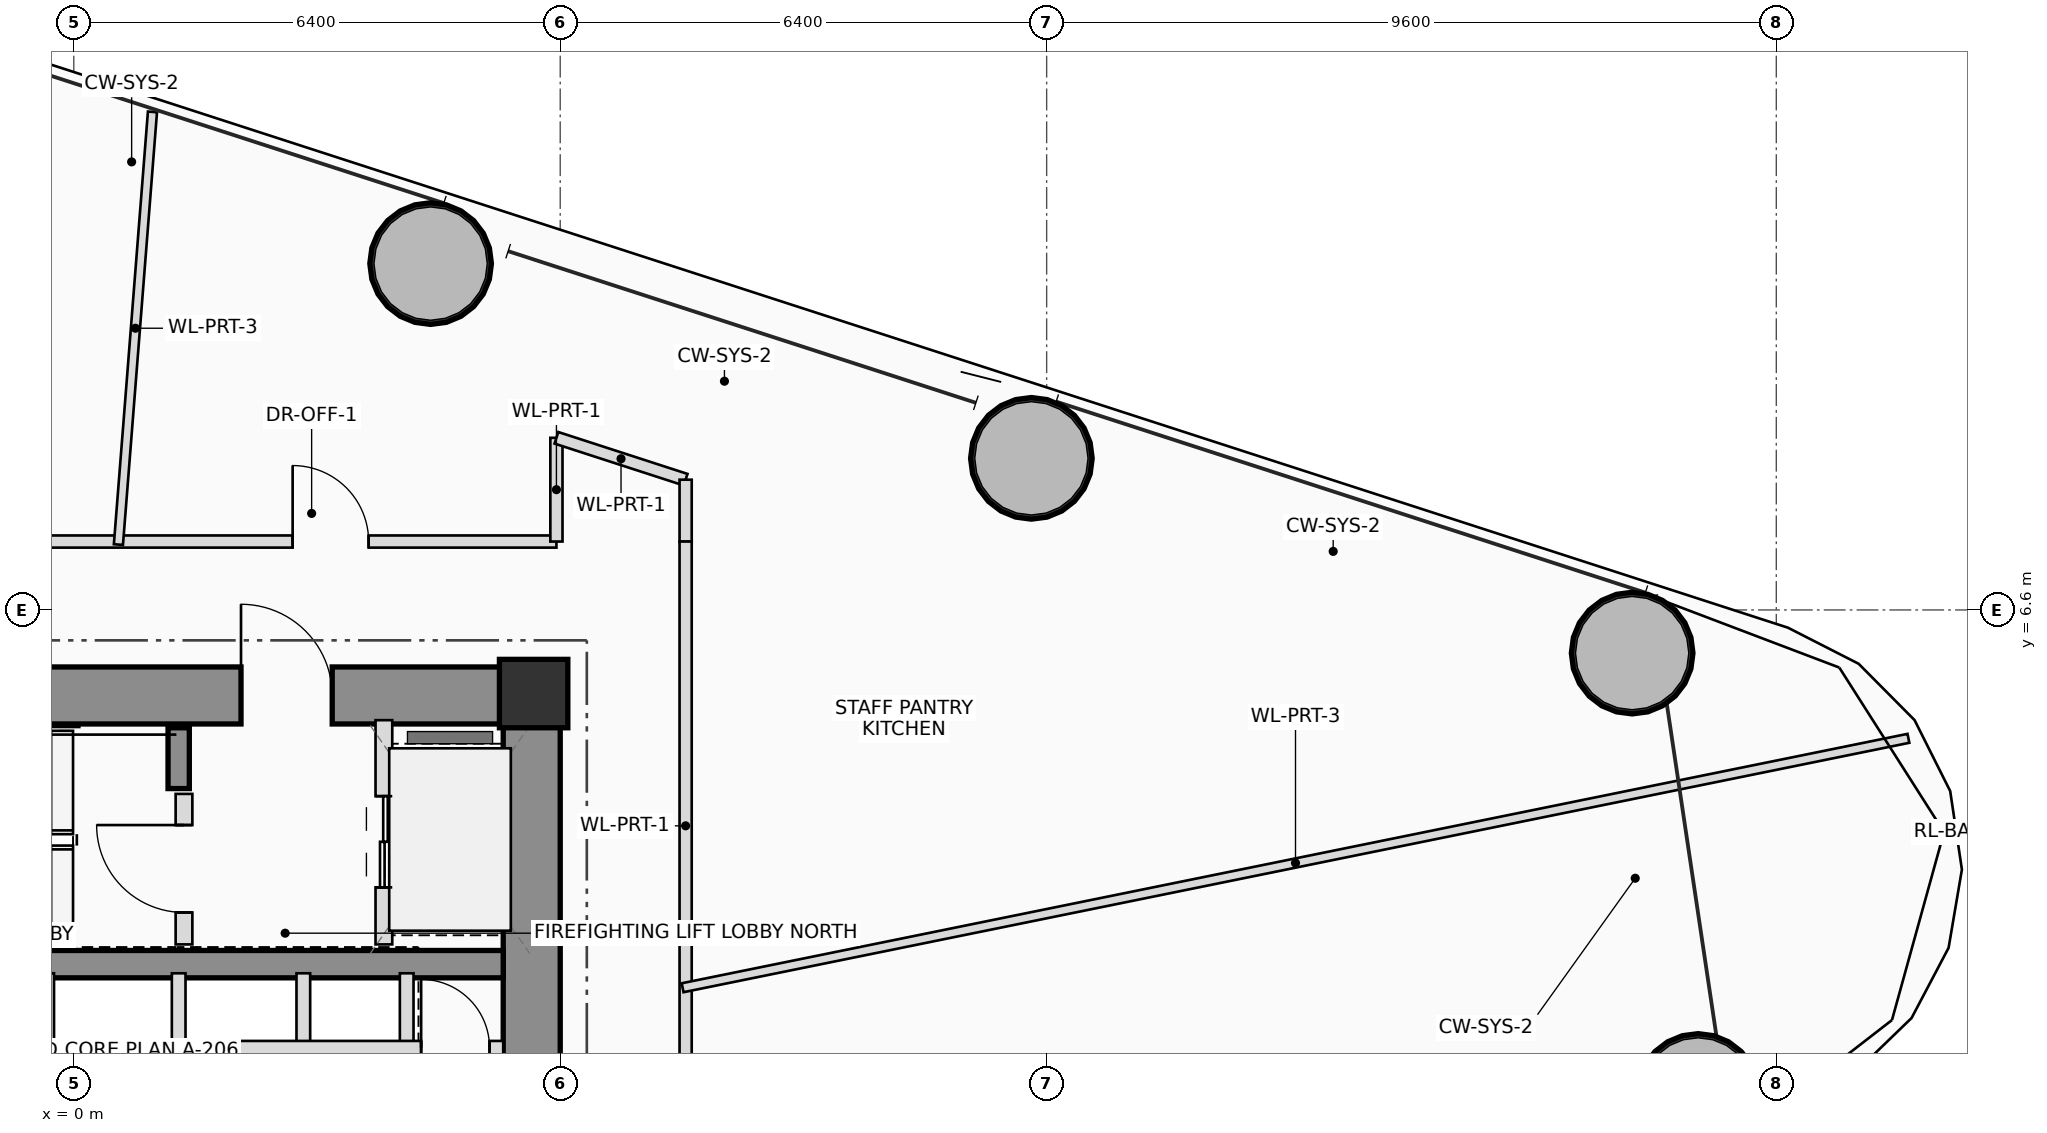
"""IFC4 building model, lengths in metres.
Left out: names, types, materials, properties, quantities, classifications, styles, units other than length and angle.
Written with IfcOpenShell. Run it as: python <this file> out.ifc"""

import sys

from ifc_helpers import new_model, si_unit, direction, frame, frame_2d, origin, origin_2d, place, context, subcontext, project, spatial, rectangle, hollow_circle, extrude, source, transform, mapped, element, fill, save


model = new_model("IFC4")
c1 = context("Model", 3, precision=1e-05, world=origin(), true_north=direction((0.0, 1.0)))
c2 = subcontext(c1, "Body", "Model", "MODEL_VIEW")
j1 = project(units=[si_unit("LENGTHUNIT", "METRE"), si_unit("PLANEANGLEUNIT", "RADIAN")], contexts=[c1])
p1 = place(None, origin())
s1 = spatial("IfcSite", under=j1, at=p1, CompositionType="ELEMENT")
p2 = place(p1, origin())
s2 = spatial("IfcBuilding", under=s1, at=p2, CompositionType="ELEMENT")
p3 = place(p2, frame((0.0, 0.0, 54.8)))
s3 = spatial("IfcBuildingStorey", under=s2, at=p3, CompositionType="ELEMENT", Elevation=54.8)
m1 = source(origin(), c2, "Body", "SweptSolid", [
    extrude(rectangle(XDim=0.9, YDim=0.9, at=origin_2d()), origin(), (0.0, 0.0, 1.0), 3.75),
])
p4 = place(p3, frame((6.05, 5.5, 0.0), z_axis=(0.0, 0.0, 1.0), x_axis=(1.0, 0.0, 0.0)))
e1 = element("IfcColumn", 1, at=p4, inside=s3, PredefinedType="COLUMN", context=c2, shape_type="MappedRepresentation", body=[
    mapped(m1, transform((0.0, 0.0, 0.0), scale=1.0)),
])
p5 = place(p3, frame((-6.4, 5.475, 0.0), z_axis=(0.0, 0.0, 1.0), x_axis=(1.0, 0.0, 0.0)))
e2 = element("IfcWall", 2, at=p5, inside=s3, PredefinedType="SHEAR", context=c2, shape_type="SweptSolid", body=[
    extrude(rectangle(XDim=12.8, YDim=0.75, at=frame_2d((6.4, 0.0))), origin(), (0.0, 0.0, 1.0), 3.75),
])
p6 = place(p5, frame((8.6, 0.0, 0.0)))
e3 = element("IfcOpeningElement", 3, at=p6, cuts=e2, PredefinedType="OPENING", context=c2, shape_type="SweptSolid", body=[
    extrude(rectangle(XDim=1.2, YDim=2.2, at=frame_2d((0.6, 1.1))), frame((0.0, 0.385, 0.0), z_axis=(0.0, -1.0, 0.0), x_axis=(1.0, 0.0, 0.0)), (0.0, 0.0, 1.0), 0.77),
])
p7 = place(p3, frame((6.025, -5.1, 0.0), z_axis=(0.0, 0.0, 1.0), x_axis=(0.0, 1.0, 0.0)))
e4 = element("IfcWall", 4, at=p7, inside=s3, PredefinedType="SHEAR", context=c2, shape_type="SweptSolid", body=[
    extrude(rectangle(XDim=10.2, YDim=0.75, at=frame_2d((5.1, 0.0))), origin(), (0.0, 0.0, 1.0), 3.75),
])
p8 = place(p3, frame((-5.65, 1.94, 0.0), z_axis=(0.0, 0.0, 1.0), x_axis=(1.0, 0.0, 0.0)))
e5 = element("IfcWall", 5, at=p8, inside=s3, PredefinedType="SHEAR", context=c2, shape_type="SweptSolid", body=[
    extrude(rectangle(XDim=11.3, YDim=0.36, at=frame_2d((5.65, 0.0))), origin(), (0.0, 0.0, 1.0), 3.75),
])
p9 = place(p3, frame((1.38, 4.25, 0.0), z_axis=(0.0, 0.0, 1.0), x_axis=(0.0, 1.0, 0.0)))
e6 = element("IfcWall", 6, at=p9, inside=s3, PredefinedType="SHEAR", context=c2, shape_type="SweptSolid", body=[
    extrude(rectangle(XDim=0.8, YDim=0.28, at=frame_2d((0.4, 0.0))), origin(), (0.0, 0.0, 1.0), 3.75),
])
m2 = source(origin(), c2, "Body", "SweptSolid", [
    extrude(hollow_circle(Radius=0.8, WallThickness=0.055, at=origin_2d()), origin(), (0.0, 0.0, 1.0), 3.75),
])
for number, where, z_axis, x_axis in (
    (7, (21.371, 0.226, 0.0), (0.0, 0.0, 1.0), (1.0, 0.0, 0.0)),
    (8, (20.503, 6.032, 0.0), (0.0, 0.0, 1.0), (1.0, 0.0, 0.0)),
    (9, (12.599, 8.594, 0.0), (0.0, 0.0, 1.0), (1.0, 0.0, 0.0)),
    (10, (4.695, 11.157, 0.0), (0.0, 0.0, 1.0), (1.0, 0.0, 0.0)),
):
    element("IfcColumn", number, at=place(p3, frame(where, z_axis=z_axis, x_axis=x_axis)), inside=s3, PredefinedType="COLUMN", context=c2, shape_type="MappedRepresentation", body=[
        mapped(m2, transform((0.0, 0.0, 0.0), scale=1.0)),
    ])
p10 = place(p3, frame((1.45, 2.2, 0.0), z_axis=(0.0, 0.0, 1.0), x_axis=(0.0, 1.0, 0.0)))
e11 = element("IfcWall", 11, at=p10, inside=s3, PredefinedType="PLUMBINGWALL", context=c2, shape_type="SweptSolid", body=[
    extrude(rectangle(XDim=1.98, YDim=0.22, at=frame_2d((0.99, 0.0))), origin(), (0.0, 0.0, 1.0), 3.545),
])
p11 = place(p10, frame((0.42, 0.0, 0.0)))
e12 = element("IfcOpeningElement", 12, at=p11, cuts=e11, PredefinedType="OPENING", context=c2, shape_type="SweptSolid", body=[
    extrude(rectangle(XDim=1.15, YDim=2.15, at=frame_2d((0.575, 1.075))), frame((0.0, 0.12, 0.0), z_axis=(0.0, -1.0, 0.0), x_axis=(1.0, 0.0, 0.0)), (0.0, 0.0, 1.0), 0.24),
])
p12 = place(p3, frame((4.08, 2.2, 0.0), z_axis=(0.0, 0.0, 1.0), x_axis=(0.0, 1.0, 0.0)))
e13 = element("IfcWall", 13, at=p12, inside=s3, PredefinedType="PLUMBINGWALL", context=c2, shape_type="SweptSolid", body=[
    extrude(rectangle(XDim=2.95, YDim=0.22, at=frame_2d((1.475, 0.0))), origin(), (0.0, 0.0, 1.0), 3.545),
])
p13 = place(p12, frame((0.75, 0.0, 0.0)))
e14 = element("IfcOpeningElement", 14, at=p13, cuts=e13, PredefinedType="OPENING", context=c2, shape_type="SweptSolid", body=[
    extrude(rectangle(XDim=1.2, YDim=2.25, at=frame_2d((0.6, 1.125))), frame((0.0, 0.12, 0.0), z_axis=(0.0, -1.0, 0.0), x_axis=(1.0, 0.0, 0.0)), (0.0, 0.0, 1.0), 0.24),
])
for number, where, z_axis, x_axis in (
    (15, (-0.35, 0.84, 0.0), (0.0, 0.0, 1.0), (0.0, 1.0, 0.0)),
    (16, (1.38, 0.84, 0.0), (0.0, 0.0, 1.0), (0.0, 1.0, 0.0)),
    (17, (3.02, 0.84, 0.0), (0.0, 0.0, 1.0), (0.0, 1.0, 0.0)),
    (18, (4.38, 0.84, 0.0), (0.0, 0.0, 1.0), (0.0, 1.0, 0.0)),
):
    element("IfcWall", number, at=place(p3, frame(where, z_axis=z_axis, x_axis=x_axis)), inside=s3, PredefinedType="PLUMBINGWALL", context=c2, shape_type="SweptSolid", body=[
        extrude(rectangle(XDim=0.98, YDim=0.18, at=frame_2d((0.49, 0.0))), origin(), (0.0, 0.0, 1.0), 3.545),
    ])
p14 = place(p3, frame((-5.68, 0.84, 0.0), z_axis=(0.0, 0.0, 1.0), x_axis=(1.0, 0.0, 0.0)))
e19 = element("IfcWall", 19, at=p14, inside=s3, PredefinedType="PLUMBINGWALL", context=c2, shape_type="SweptSolid", body=[
    extrude(rectangle(XDim=11.33, YDim=0.18, at=frame_2d((5.665, 0.0))), origin(), (0.0, 0.0, 1.0), 3.545),
])
p15 = place(p14, frame((0.43, 0.0, 0.0)))
e20 = element("IfcOpeningElement", 20, at=p15, cuts=e19, PredefinedType="OPENING", context=c2, shape_type="SweptSolid", body=[
    extrude(rectangle(XDim=1.1, YDim=2.2, at=frame_2d((0.55, 1.1))), frame((0.0, 0.1, 0.0), z_axis=(0.0, -1.0, 0.0), x_axis=(1.0, 0.0, 0.0)), (0.0, 0.0, 1.0), 0.2),
])
p16 = place(p14, frame((2.13, 0.0, 0.0)))
e21 = element("IfcOpeningElement", 21, at=p16, cuts=e19, PredefinedType="OPENING", context=c2, shape_type="SweptSolid", body=[
    extrude(rectangle(XDim=1.1, YDim=2.2, at=frame_2d((0.55, 1.1))), frame((0.0, 0.1, 0.0), z_axis=(0.0, -1.0, 0.0), x_axis=(1.0, 0.0, 0.0)), (0.0, 0.0, 1.0), 0.2),
])
p17 = place(p14, frame((10.25, 0.0, 0.0)))
e22 = element("IfcOpeningElement", 22, at=p17, cuts=e19, PredefinedType="OPENING", context=c2, shape_type="SweptSolid", body=[
    extrude(rectangle(XDim=0.9, YDim=2.05, at=frame_2d((0.45, 1.025))), frame((0.0, 0.1, 0.0), z_axis=(0.0, -1.0, 0.0), x_axis=(1.0, 0.0, 0.0)), (0.0, 0.0, 1.0), 0.2),
])
p18 = place(p3, frame((-6.35, 7.5, 0.0), z_axis=(0.0, 0.0, 1.0), x_axis=(1.0, 0.0, 0.0)))
e23 = element("IfcWall", 23, at=p18, inside=s3, PredefinedType="PARTITIONING", context=c2, shape_type="SweptSolid", body=[
    extrude(rectangle(XDim=12.7, YDim=0.16, at=frame_2d((6.35, 0.0))), origin(), (0.0, 0.0, 1.0), 2.85),
])
p19 = place(p18, frame((9.229, 0.0, 0.0)))
e24 = element("IfcOpeningElement", 24, at=p19, cuts=e23, PredefinedType="OPENING", context=c2, shape_type="SweptSolid", body=[
    extrude(rectangle(XDim=1.0, YDim=2.25, at=frame_2d((0.5, 1.125))), frame((0.0, 0.09, 0.0), z_axis=(0.0, -1.0, 0.0), x_axis=(1.0, 0.0, 0.0)), (0.0, 0.0, 1.0), 0.18),
])
p20 = place(p3, frame((6.35, 7.5, 0.0), z_axis=(0.0, 0.0, 1.0), x_axis=(0.0, 1.0, 0.0)))
e25 = element("IfcWall", 25, at=p20, inside=s3, PredefinedType="PARTITIONING", context=c2, shape_type="SweptSolid", body=[
    extrude(rectangle(XDim=1.365, YDim=0.16, at=frame_2d((0.682, 0.0))), origin(), (0.0, 0.0, 1.0), 3.05),
])
p21 = place(p3, frame((6.35, 8.865, 0.0), z_axis=(0.0, 0.0, 1.0), x_axis=(0.951273733128, -0.308347668486, 0.0)))
e26 = element("IfcWall", 26, at=p21, inside=s3, PredefinedType="PARTITIONING", context=c2, shape_type="SweptSolid", body=[
    extrude(rectangle(XDim=1.787, YDim=0.16, at=frame_2d((0.894, 0.0))), origin(), (0.0, 0.0, 1.0), 3.2),
])
p22 = place(p3, frame((8.05, 8.314, 0.0), z_axis=(0.0, 0.0, 1.0), x_axis=(0.0, -1.0, 0.0)))
e27 = element("IfcWall", 27, at=p22, inside=s3, PredefinedType="PARTITIONING", context=c2, shape_type="SweptSolid", body=[
    extrude(rectangle(XDim=0.814, YDim=0.16, at=frame_2d((0.407, 0.0))), origin(), (0.0, 0.0, 1.0), 3.05),
])
p23 = place(p3, frame((8.05, 7.5, 0.0), z_axis=(0.0, 0.0, 1.0), x_axis=(0.0, -1.0, 0.0)))
e28 = element("IfcWall", 28, at=p23, inside=s3, PredefinedType="PARTITIONING", context=c2, shape_type="SweptSolid", body=[
    extrude(rectangle(XDim=7.48, YDim=0.16, at=frame_2d((3.74, 0.0))), origin(), (0.0, 0.0, 1.0), 2.85),
])
p24 = place(p3, frame((0.587, 7.46, 0.0), z_axis=(0.0, 0.0, 1.0), x_axis=(0.078455369282, 0.996917627004, 0.0)))
e29 = element("IfcWall", 29, at=p24, inside=s3, PredefinedType="PARTITIONING", context=c2, shape_type="SweptSolid", body=[
    extrude(rectangle(XDim=5.71, YDim=0.12, at=frame_2d((2.855, 0.0))), origin(), (0.0, 0.0, 1.0), 3.01),
])
p25 = place(p3, frame((8.01, 1.63, 0.0), z_axis=(0.0, 0.0, 1.0), x_axis=(0.979925464906, 0.199364197459, 0.0)))
e30 = element("IfcWall", 30, at=p25, inside=s3, PredefinedType="PARTITIONING", context=c2, shape_type="SweptSolid", body=[
    extrude(rectangle(XDim=16.458, YDim=0.12, at=frame_2d((8.229, 0.0))), origin(), (0.0, 0.0, 1.0), 3.01),
])
p26 = place(p6, origin())
e31 = element("IfcDoor", 31, at=p26, inside=s3, OperationType="SINGLE_SWING_LEFT", PredefinedType="DOOR", context=c2, shape_type="SweptSolid", body=[
    extrude(rectangle(XDim=1.2, YDim=2.2, at=frame_2d((0.6, 1.1))), frame((0.0, 0.025, 0.0), z_axis=(0.0, -1.0, 0.0), x_axis=(1.0, 0.0, 0.0)), (0.0, 0.0, 1.0), 0.05),
])
fill(e3, e31)
p27 = place(p11, origin())
e32 = element("IfcDoor", 32, at=p27, inside=s3, OperationType="SINGLE_SWING_RIGHT", PredefinedType="DOOR", context=c2, shape_type="SweptSolid", body=[
    extrude(rectangle(XDim=1.15, YDim=2.15, at=frame_2d((0.575, 1.075))), frame((0.0, 0.025, 0.0), z_axis=(0.0, -1.0, 0.0), x_axis=(1.0, 0.0, 0.0)), (0.0, 0.0, 1.0), 0.05),
])
fill(e12, e32)
p28 = place(p13, origin())
e33 = element("IfcDoor", 33, at=p28, inside=s3, OperationType="DOUBLE_DOOR_SLIDING", PredefinedType="DOOR", context=c2, shape_type="SweptSolid", body=[
    extrude(rectangle(XDim=1.2, YDim=2.25, at=frame_2d((0.6, 1.125))), frame((0.0, 0.025, 0.0), z_axis=(0.0, -1.0, 0.0), x_axis=(1.0, 0.0, 0.0)), (0.0, 0.0, 1.0), 0.05),
])
fill(e14, e33)
p29 = place(p17, origin())
e34 = element("IfcDoor", 34, at=p29, inside=s3, OperationType="SINGLE_SWING_LEFT", PredefinedType="DOOR", context=c2, shape_type="SweptSolid", body=[
    extrude(rectangle(XDim=0.9, YDim=2.05, at=frame_2d((0.45, 1.025))), frame((0.0, 0.025, 0.0), z_axis=(0.0, -1.0, 0.0), x_axis=(1.0, 0.0, 0.0)), (0.0, 0.0, 1.0), 0.05),
])
fill(e22, e34)
p30 = place(p19, origin())
e35 = element("IfcDoor", 35, at=p30, inside=s3, OperationType="SINGLE_SWING_LEFT", PredefinedType="DOOR", context=c2, shape_type="SweptSolid", body=[
    extrude(rectangle(XDim=1.0, YDim=2.25, at=frame_2d((0.5, 1.125))), frame((0.0, 0.025, 0.0), z_axis=(0.0, -1.0, 0.0), x_axis=(1.0, 0.0, 0.0)), (0.0, 0.0, 1.0), 0.05),
])
fill(e24, e35)
save(model, sys.argv[1])
